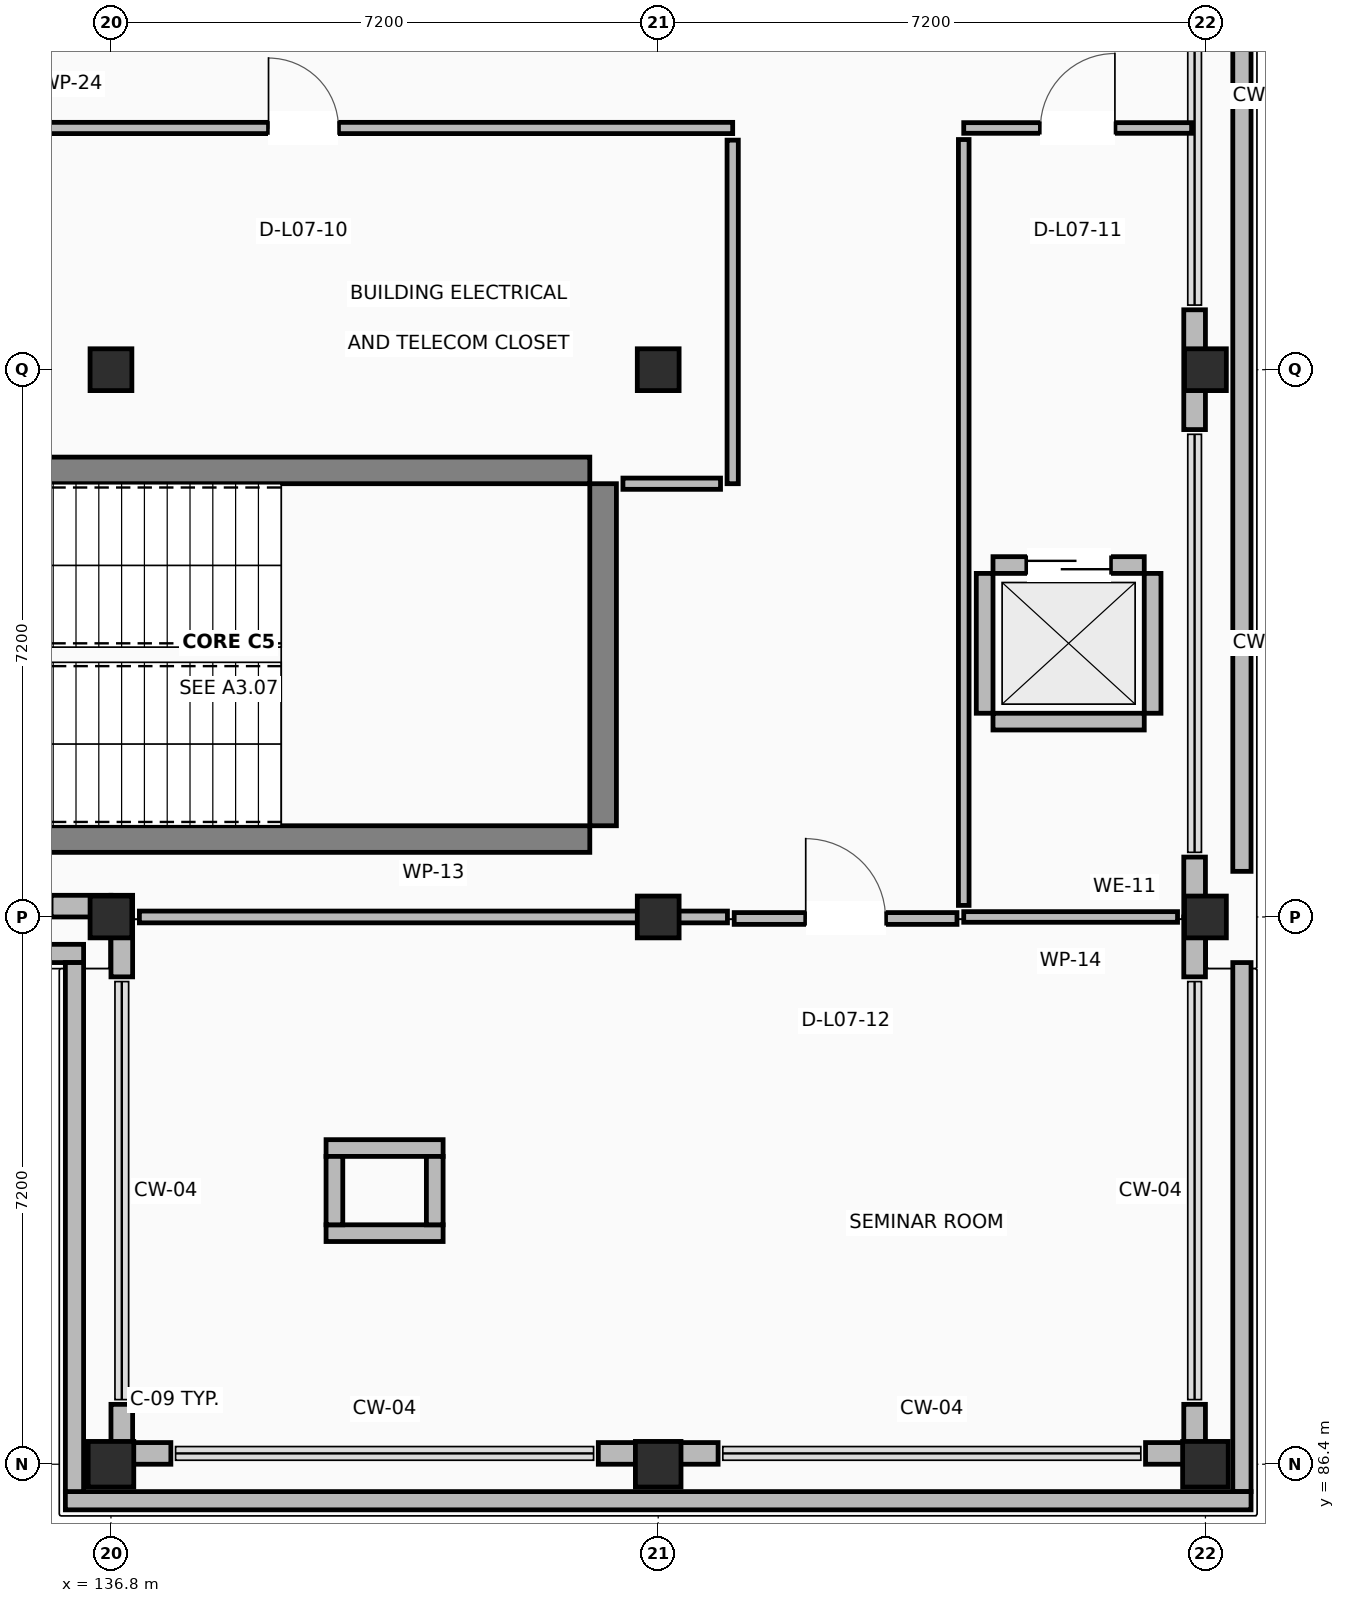
"""IFC4 building model, lengths in metres.
Left out: names, types, materials, properties, quantities, classifications, styles, units other than length and angle.
Written with IfcOpenShell. Run it as: python <this file> out.ifc"""

import sys

from ifc_helpers import new_model, si_unit, direction, frame, frame_2d, origin, origin_2d, place, context, subcontext, project, spatial, rectangle, extrude, element, fill, save


model = new_model("IFC4")
c1 = context("Model", 3, precision=1e-05, world=origin(), true_north=direction((0.0, 1.0)))
c2 = subcontext(c1, "Body", "Model", "MODEL_VIEW")
j1 = project(units=[si_unit("LENGTHUNIT", "METRE"), si_unit("PLANEANGLEUNIT", "RADIAN")], contexts=[c1])
p1 = place(None, origin())
s1 = spatial("IfcSite", under=j1, at=p1, CompositionType="ELEMENT")
p2 = place(p1, origin())
s2 = spatial("IfcBuilding", under=s1, at=p2, CompositionType="ELEMENT")
p3 = place(p2, frame((0.0, 0.0, 31.2)))
s3 = spatial("IfcBuildingStorey", under=s2, at=p3, CompositionType="ELEMENT", Elevation=31.2)
p4 = place(p3, frame((136.8, 86.4, 0.0), z_axis=(0.0, 0.0, 1.0), x_axis=(1.0, 0.0, 0.0)))
e1 = element("IfcColumn", 1, at=p4, inside=s3, PredefinedType="COLUMN", context=c2, shape_type="SweptSolid", body=[
    extrude(rectangle(XDim=0.6, YDim=0.6, at=origin_2d()), origin(), (0.0, 0.0, 1.0), 3.92),
])
for number, where, z_axis, x_axis in (
    (2, (136.8, 93.6, 0.0), (0.0, 0.0, 1.0), (1.0, 0.0, 0.0)),
    (3, (136.8, 100.8, 0.0), (0.0, 0.0, 1.0), (1.0, 0.0, 0.0)),
):
    element("IfcColumn", number, at=place(p3, frame(where, z_axis=z_axis, x_axis=x_axis)), inside=s3, PredefinedType="COLUMN", context=c2, shape_type="SweptSolid", body=[
        extrude(rectangle(XDim=0.55, YDim=0.55, at=origin_2d()), origin(), (0.0, 0.0, 1.0), 3.92),
    ])
p5 = place(p3, frame((144.0, 86.4, 0.0), z_axis=(0.0, 0.0, 1.0), x_axis=(1.0, 0.0, 0.0)))
e4 = element("IfcColumn", 4, at=p5, inside=s3, PredefinedType="COLUMN", context=c2, shape_type="SweptSolid", body=[
    extrude(rectangle(XDim=0.6, YDim=0.6, at=origin_2d()), origin(), (0.0, 0.0, 1.0), 3.92),
])
for number, where, z_axis, x_axis in (
    (5, (144.0, 93.6, 0.0), (0.0, 0.0, 1.0), (1.0, 0.0, 0.0)),
    (6, (144.0, 100.8, 0.0), (0.0, 0.0, 1.0), (1.0, 0.0, 0.0)),
):
    element("IfcColumn", number, at=place(p3, frame(where, z_axis=z_axis, x_axis=x_axis)), inside=s3, PredefinedType="COLUMN", context=c2, shape_type="SweptSolid", body=[
        extrude(rectangle(XDim=0.55, YDim=0.55, at=origin_2d()), origin(), (0.0, 0.0, 1.0), 3.92),
    ])
p6 = place(p3, frame((151.2, 86.4, 0.0), z_axis=(0.0, 0.0, 1.0), x_axis=(1.0, 0.0, 0.0)))
e7 = element("IfcColumn", 7, at=p6, inside=s3, PredefinedType="COLUMN", context=c2, shape_type="SweptSolid", body=[
    extrude(rectangle(XDim=0.6, YDim=0.6, at=origin_2d()), origin(), (0.0, 0.0, 1.0), 3.92),
])
for number, where, z_axis, x_axis in (
    (8, (151.2, 93.6, 0.0), (0.0, 0.0, 1.0), (1.0, 0.0, 0.0)),
    (9, (151.2, 100.8, 0.0), (0.0, 0.0, 1.0), (1.0, 0.0, 0.0)),
):
    element("IfcColumn", number, at=place(p3, frame(where, z_axis=z_axis, x_axis=x_axis)), inside=s3, PredefinedType="COLUMN", context=c2, shape_type="SweptSolid", body=[
        extrude(rectangle(XDim=0.55, YDim=0.55, at=origin_2d()), origin(), (0.0, 0.0, 1.0), 3.92),
    ])
for number, where, z_axis, x_axis in (
    (10, (133.6, 94.625, 0.0), (0.0, 0.0, 1.0), (1.0, 0.0, 0.0)),
    (11, (133.6, 99.475, 0.0), (0.0, 0.0, 1.0), (1.0, 0.0, 0.0)),
):
    element("IfcWall", number, at=place(p3, frame(where, z_axis=z_axis, x_axis=x_axis)), inside=s3, PredefinedType="SHEAR", context=c2, shape_type="SweptSolid", body=[
        extrude(rectangle(XDim=9.5, YDim=0.35, at=frame_2d((4.75, 0.0))), origin(), (0.0, 0.0, 1.0), 3.92),
    ])
p7 = place(p3, frame((143.275, 94.8, 0.0), z_axis=(0.0, 0.0, 1.0), x_axis=(0.0, 1.0, 0.0)))
e12 = element("IfcWall", 12, at=p7, inside=s3, PredefinedType="SHEAR", context=c2, shape_type="SweptSolid", body=[
    extrude(rectangle(XDim=4.5, YDim=0.35, at=frame_2d((2.25, 0.0))), origin(), (0.0, 0.0, 1.0), 3.92),
])
p8 = place(p3, frame((151.058, 93.6, 0.0), z_axis=(0.0, 0.0, 1.0), x_axis=(0.0, 1.0, 0.0)))
e13 = element("IfcWall", 13, at=p8, inside=s3, PredefinedType="STANDARD", context=c2, shape_type="SweptSolid", body=[
    extrude(rectangle(XDim=0.788, YDim=0.285, at=frame_2d((0.394, 0.0))), origin(), (0.0, 0.0, 1.0), 2.96),
])
p9 = place(p3, frame((151.058, 100.012, 0.0), z_axis=(0.0, 0.0, 1.0), x_axis=(0.0, 1.0, 0.0)))
e14 = element("IfcWall", 14, at=p9, inside=s3, PredefinedType="STANDARD", context=c2, shape_type="SweptSolid", body=[
    extrude(rectangle(XDim=1.576, YDim=0.285, at=frame_2d((0.788, 0.0))), origin(), (0.0, 0.0, 1.0), 2.96),
])
p10 = place(p3, frame((136.012, 93.742, 0.0), z_axis=(0.0, 0.0, 1.0), x_axis=(1.0, 0.0, 0.0)))
e15 = element("IfcWall", 15, at=p10, inside=s3, PredefinedType="STANDARD", context=c2, shape_type="SweptSolid", body=[
    extrude(rectangle(XDim=0.788, YDim=0.285, at=frame_2d((0.394, 0.0))), origin(), (0.0, 0.0, 1.0), 2.96),
])
p11 = place(p3, frame((136.942, 93.885, 0.0), z_axis=(0.0, 0.0, 1.0), x_axis=(0.0, -1.0, 0.0)))
e16 = element("IfcWall", 16, at=p11, inside=s3, PredefinedType="STANDARD", context=c2, shape_type="SweptSolid", body=[
    extrude(rectangle(XDim=1.073, YDim=0.285, at=frame_2d((0.537, 0.0))), origin(), (0.0, 0.0, 1.0), 2.96),
])
p12 = place(p3, frame((136.942, 87.188, 0.0), z_axis=(0.0, 0.0, 1.0), x_axis=(0.0, -1.0, 0.0)))
e17 = element("IfcWall", 17, at=p12, inside=s3, PredefinedType="STANDARD", context=c2, shape_type="SweptSolid", body=[
    extrude(rectangle(XDim=0.503, YDim=0.285, at=frame_2d((0.251, 0.0))), origin(), (0.0, 0.0, 1.0), 2.96),
])
p13 = place(p3, frame((136.8, 86.542, 0.0), z_axis=(0.0, 0.0, 1.0), x_axis=(1.0, 0.0, 0.0)))
e18 = element("IfcWall", 18, at=p13, inside=s3, PredefinedType="STANDARD", context=c2, shape_type="SweptSolid", body=[
    extrude(rectangle(XDim=0.788, YDim=0.285, at=frame_2d((0.394, 0.0))), origin(), (0.0, 0.0, 1.0), 2.96),
])
p14 = place(p3, frame((143.212, 86.542, 0.0), z_axis=(0.0, 0.0, 1.0), x_axis=(1.0, 0.0, 0.0)))
e19 = element("IfcWall", 19, at=p14, inside=s3, PredefinedType="STANDARD", context=c2, shape_type="SweptSolid", body=[
    extrude(rectangle(XDim=1.576, YDim=0.285, at=frame_2d((0.788, 0.0))), origin(), (0.0, 0.0, 1.0), 2.96),
])
p15 = place(p3, frame((150.412, 86.542, 0.0), z_axis=(0.0, 0.0, 1.0), x_axis=(1.0, 0.0, 0.0)))
e20 = element("IfcWall", 20, at=p15, inside=s3, PredefinedType="STANDARD", context=c2, shape_type="SweptSolid", body=[
    extrude(rectangle(XDim=0.788, YDim=0.285, at=frame_2d((0.394, 0.0))), origin(), (0.0, 0.0, 1.0), 2.96),
])
p16 = place(p3, frame((151.058, 86.685, 0.0), z_axis=(0.0, 0.0, 1.0), x_axis=(0.0, 1.0, 0.0)))
e21 = element("IfcWall", 21, at=p16, inside=s3, PredefinedType="STANDARD", context=c2, shape_type="SweptSolid", body=[
    extrude(rectangle(XDim=0.503, YDim=0.285, at=frame_2d((0.251, 0.0))), origin(), (0.0, 0.0, 1.0), 2.96),
])
p17 = place(p3, frame((151.058, 92.812, 0.0), z_axis=(0.0, 0.0, 1.0), x_axis=(0.0, 1.0, 0.0)))
e22 = element("IfcWall", 22, at=p17, inside=s3, PredefinedType="STANDARD", context=c2, shape_type="SweptSolid", body=[
    extrude(rectangle(XDim=0.788, YDim=0.285, at=frame_2d((0.394, 0.0))), origin(), (0.0, 0.0, 1.0), 2.96),
])
p18 = place(p3, frame((136.44, 93.12, 0.0), z_axis=(0.0, 0.0, 1.0), x_axis=(-1.0, 0.0, 0.0)))
e23 = element("IfcWall", 23, at=p18, inside=s3, PredefinedType="PARAPET", context=c2, shape_type="SweptSolid", body=[
    extrude(rectangle(XDim=49.48, YDim=0.24, at=frame_2d((24.74, 0.0))), origin(), (0.0, 0.0, 1.0), 1.12),
])
p19 = place(p3, frame((151.68, 115.56, 0.0), z_axis=(0.0, 0.0, 1.0), x_axis=(0.0, -1.0, 0.0)))
e24 = element("IfcWall", 24, at=p19, inside=s3, PredefinedType="PARAPET", context=c2, shape_type="SweptSolid", body=[
    extrude(rectangle(XDim=21.36, YDim=0.24, at=frame_2d((10.68, 0.0))), origin(), (0.0, 0.0, 1.0), 1.12),
])
p20 = place(p3, frame((151.68, 93.0, 0.0), z_axis=(0.0, 0.0, 1.0), x_axis=(0.0, -1.0, 0.0)))
e25 = element("IfcWall", 25, at=p20, inside=s3, PredefinedType="PARAPET", context=c2, shape_type="SweptSolid", body=[
    extrude(rectangle(XDim=6.96, YDim=0.24, at=frame_2d((3.48, 0.0))), origin(), (0.0, 0.0, 1.0), 1.12),
])
p21 = place(p3, frame((151.8, 85.92, 0.0), z_axis=(0.0, 0.0, 1.0), x_axis=(-1.0, 0.0, 0.0)))
e26 = element("IfcWall", 26, at=p21, inside=s3, PredefinedType="PARAPET", context=c2, shape_type="SweptSolid", body=[
    extrude(rectangle(XDim=15.6, YDim=0.24, at=frame_2d((7.8, 0.0))), origin(), (0.0, 0.0, 1.0), 1.12),
])
p22 = place(p3, frame((136.32, 86.04, 0.0), z_axis=(0.0, 0.0, 1.0), x_axis=(0.0, 1.0, 0.0)))
e27 = element("IfcWall", 27, at=p22, inside=s3, PredefinedType="PARAPET", context=c2, shape_type="SweptSolid", body=[
    extrude(rectangle(XDim=6.96, YDim=0.24, at=frame_2d((3.48, 0.0))), origin(), (0.0, 0.0, 1.0), 1.12),
])
p23 = place(p3, frame((148.405, 96.17, 0.0), z_axis=(0.0, 0.0, 1.0), x_axis=(1.0, 0.0, 0.0)))
e28 = element("IfcWall", 28, at=p23, inside=s3, PredefinedType="STANDARD", context=c2, shape_type="SweptSolid", body=[
    extrude(rectangle(XDim=1.99, YDim=0.22, at=frame_2d((0.995, 0.0))), origin(), (0.0, 0.0, 1.0), 2.96),
])
p24 = place(p3, frame((148.405, 98.23, 0.0), z_axis=(0.0, 0.0, 1.0), x_axis=(1.0, 0.0, 0.0)))
e29 = element("IfcWall", 29, at=p24, inside=s3, PredefinedType="STANDARD", context=c2, shape_type="SweptSolid", body=[
    extrude(rectangle(XDim=1.99, YDim=0.22, at=frame_2d((0.995, 0.0))), origin(), (0.0, 0.0, 1.0), 2.96),
])
p25 = place(p24, frame((0.445, 0.0, 0.0)))
e30 = element("IfcOpeningElement", 30, at=p25, cuts=e29, PredefinedType="OPENING", context=c2, shape_type="SweptSolid", body=[
    extrude(rectangle(XDim=1.1, YDim=2.15, at=frame_2d((0.55, 1.075))), frame((0.0, 0.12, 0.0), z_axis=(0.0, -1.0, 0.0), x_axis=(1.0, 0.0, 0.0)), (0.0, 0.0, 1.0), 0.24),
])
for number, where, z_axis, x_axis in (
    (31, (148.295, 96.28, 0.0), (0.0, 0.0, 1.0), (0.0, 1.0, 0.0)),
    (32, (150.505, 96.28, 0.0), (0.0, 0.0, 1.0), (0.0, 1.0, 0.0)),
):
    element("IfcWall", number, at=place(p3, frame(where, z_axis=z_axis, x_axis=x_axis)), inside=s3, PredefinedType="STANDARD", context=c2, shape_type="SweptSolid", body=[
        extrude(rectangle(XDim=1.84, YDim=0.22, at=frame_2d((0.92, 0.0))), origin(), (0.0, 0.0, 1.0), 2.96),
    ])
for number, where, z_axis, x_axis in (
    (33, (139.63, 89.44, 0.0), (0.0, 0.0, 1.0), (1.0, 0.0, 0.0)),
    (34, (139.63, 90.56, 0.0), (0.0, 0.0, 1.0), (1.0, 0.0, 0.0)),
):
    element("IfcWall", number, at=place(p3, frame(where, z_axis=z_axis, x_axis=x_axis)), inside=s3, PredefinedType="STANDARD", context=c2, shape_type="SweptSolid", body=[
        extrude(rectangle(XDim=1.54, YDim=0.22, at=frame_2d((0.77, 0.0))), origin(), (0.0, 0.0, 1.0), 2.96),
    ])
for number, where, z_axis, x_axis in (
    (35, (139.74, 89.55, 0.0), (0.0, 0.0, 1.0), (0.0, 1.0, 0.0)),
    (36, (141.06, 89.55, 0.0), (0.0, 0.0, 1.0), (0.0, 1.0, 0.0)),
):
    element("IfcWall", number, at=place(p3, frame(where, z_axis=z_axis, x_axis=x_axis)), inside=s3, PredefinedType="STANDARD", context=c2, shape_type="SweptSolid", body=[
        extrude(rectangle(XDim=0.9, YDim=0.22, at=frame_2d((0.45, 0.0))), origin(), (0.0, 0.0, 1.0), 2.96),
    ])
p26 = place(p3, frame((133.686, 103.98, 0.0), z_axis=(0.0, 0.0, 1.0), x_axis=(1.0, 0.0, 0.0)))
e37 = element("IfcWall", 37, at=p26, inside=s3, PredefinedType="PARTITIONING", context=c2, shape_type="SweptSolid", body=[
    extrude(rectangle(XDim=11.294, YDim=0.148, at=frame_2d((5.647, 0.0))), origin(), (0.0, 0.0, 1.0), 2.96),
])
p27 = place(p26, frame((5.187, 0.0, 0.0)))
e38 = element("IfcOpeningElement", 38, at=p27, cuts=e37, PredefinedType="OPENING", context=c2, shape_type="SweptSolid", body=[
    extrude(rectangle(XDim=0.92, YDim=2.1, at=frame_2d((0.46, 1.05))), frame((0.0, 0.084, 0.0), z_axis=(0.0, -1.0, 0.0), x_axis=(1.0, 0.0, 0.0)), (0.0, 0.0, 1.0), 0.168),
])
p28 = place(p3, frame((144.98, 103.82, 0.0), z_axis=(0.0, 0.0, 1.0), x_axis=(0.0, -1.0, 0.0)))
e39 = element("IfcWall", 39, at=p28, inside=s3, PredefinedType="PARTITIONING", context=c2, shape_type="SweptSolid", body=[
    extrude(rectangle(XDim=4.52, YDim=0.148, at=frame_2d((2.26, 0.0))), origin(), (0.0, 0.0, 1.0), 2.96),
])
p29 = place(p3, frame((144.82, 99.3, 0.0), z_axis=(0.0, 0.0, 1.0), x_axis=(-1.0, 0.0, 0.0)))
e40 = element("IfcWall", 40, at=p29, inside=s3, PredefinedType="PARTITIONING", context=c2, shape_type="SweptSolid", body=[
    extrude(rectangle(XDim=1.284, YDim=0.148, at=frame_2d((0.642, 0.0))), origin(), (0.0, 0.0, 1.0), 2.96),
])
p30 = place(p3, frame((148.02, 103.98, 0.0), z_axis=(0.0, 0.0, 1.0), x_axis=(1.0, 0.0, 0.0)))
e41 = element("IfcWall", 41, at=p30, inside=s3, PredefinedType="PARTITIONING", context=c2, shape_type="SweptSolid", body=[
    extrude(rectangle(XDim=2.998, YDim=0.14, at=frame_2d((1.499, 0.0))), origin(), (0.0, 0.0, 1.0), 2.96),
])
p31 = place(p30, frame((1.009, 0.0, 0.0)))
e42 = element("IfcOpeningElement", 42, at=p31, cuts=e41, PredefinedType="OPENING", context=c2, shape_type="SweptSolid", body=[
    extrude(rectangle(XDim=0.98, YDim=2.1, at=frame_2d((0.49, 1.05))), frame((0.0, 0.08, 0.0), z_axis=(0.0, -1.0, 0.0), x_axis=(1.0, 0.0, 0.0)), (0.0, 0.0, 1.0), 0.16),
])
p32 = place(p3, frame((150.833, 93.6, 0.0), z_axis=(0.0, 0.0, 1.0), x_axis=(-1.0, 0.0, 0.0)))
e43 = element("IfcWall", 43, at=p32, inside=s3, PredefinedType="PARTITIONING", context=c2, shape_type="SweptSolid", body=[
    extrude(rectangle(XDim=2.813, YDim=0.14, at=frame_2d((1.406, 0.0))), origin(), (0.0, 0.0, 1.0), 2.96),
])
p33 = place(p3, frame((148.02, 93.752, 0.0), z_axis=(0.0, 0.0, 1.0), x_axis=(0.0, 1.0, 0.0)))
e44 = element("IfcWall", 44, at=p33, inside=s3, PredefinedType="PARTITIONING", context=c2, shape_type="SweptSolid", body=[
    extrude(rectangle(XDim=10.076, YDim=0.14, at=frame_2d((5.038, 0.0))), origin(), (0.0, 0.0, 1.0), 2.96),
])
p34 = place(p3, frame((145.0, 93.58, 0.0), z_axis=(0.0, 0.0, 1.0), x_axis=(1.0, 0.0, 0.0)))
e45 = element("IfcWall", 45, at=p34, inside=s3, PredefinedType="PARTITIONING", context=c2, shape_type="SweptSolid", body=[
    extrude(rectangle(XDim=2.931, YDim=0.155, at=frame_2d((1.465, 0.0))), origin(), (0.0, 0.0, 1.0), 2.96),
])
p35 = place(p34, frame((0.941, 0.0, 0.0)))
e46 = element("IfcOpeningElement", 46, at=p35, cuts=e45, PredefinedType="OPENING", context=c2, shape_type="SweptSolid", body=[
    extrude(rectangle(XDim=1.05, YDim=2.15, at=frame_2d((0.525, 1.075))), frame((0.0, 0.087, 0.0), z_axis=(0.0, -1.0, 0.0), x_axis=(1.0, 0.0, 0.0)), (0.0, 0.0, 1.0), 0.175),
])
p36 = place(p3, frame((137.174, 93.6, 0.0), z_axis=(0.0, 0.0, 1.0), x_axis=(1.0, 0.0, 0.0)))
e47 = element("IfcWall", 47, at=p36, inside=s3, PredefinedType="PARTITIONING", context=c2, shape_type="SweptSolid", body=[
    extrude(rectangle(XDim=7.737, YDim=0.155, at=frame_2d((3.868, 0.0))), origin(), (0.0, 0.0, 1.0), 2.96),
])
p37 = place(p25, origin())
e48 = element("IfcDoor", 48, at=p37, inside=s3, OperationType="SLIDING_TO_RIGHT", PredefinedType="DOOR", context=c2, shape_type="SweptSolid", body=[
    extrude(rectangle(XDim=1.1, YDim=2.15, at=frame_2d((0.55, 1.075))), frame((0.0, 0.025, 0.0), z_axis=(0.0, -1.0, 0.0), x_axis=(1.0, 0.0, 0.0)), (0.0, 0.0, 1.0), 0.05),
])
fill(e30, e48)
p38 = place(p27, origin())
e49 = element("IfcDoor", 49, at=p38, inside=s3, OperationType="SINGLE_SWING_LEFT", PredefinedType="DOOR", context=c2, shape_type="SweptSolid", body=[
    extrude(rectangle(XDim=0.92, YDim=2.1, at=frame_2d((0.46, 1.05))), frame((0.0, 0.025, 0.0), z_axis=(0.0, -1.0, 0.0), x_axis=(1.0, 0.0, 0.0)), (0.0, 0.0, 1.0), 0.05),
])
fill(e38, e49)
p39 = place(p31, origin())
e50 = element("IfcDoor", 50, at=p39, inside=s3, OperationType="SINGLE_SWING_RIGHT", PredefinedType="DOOR", context=c2, shape_type="SweptSolid", body=[
    extrude(rectangle(XDim=0.98, YDim=2.1, at=frame_2d((0.49, 1.05))), frame((0.0, 0.025, 0.0), z_axis=(0.0, -1.0, 0.0), x_axis=(1.0, 0.0, 0.0)), (0.0, 0.0, 1.0), 0.05),
])
fill(e42, e50)
p40 = place(p35, origin())
e51 = element("IfcDoor", 51, at=p40, inside=s3, OperationType="SINGLE_SWING_LEFT", PredefinedType="DOOR", context=c2, shape_type="SweptSolid", body=[
    extrude(rectangle(XDim=1.05, YDim=2.15, at=frame_2d((0.525, 1.075))), frame((0.0, 0.025, 0.0), z_axis=(0.0, -1.0, 0.0), x_axis=(1.0, 0.0, 0.0)), (0.0, 0.0, 1.0), 0.05),
])
fill(e46, e51)
save(model, sys.argv[1])
